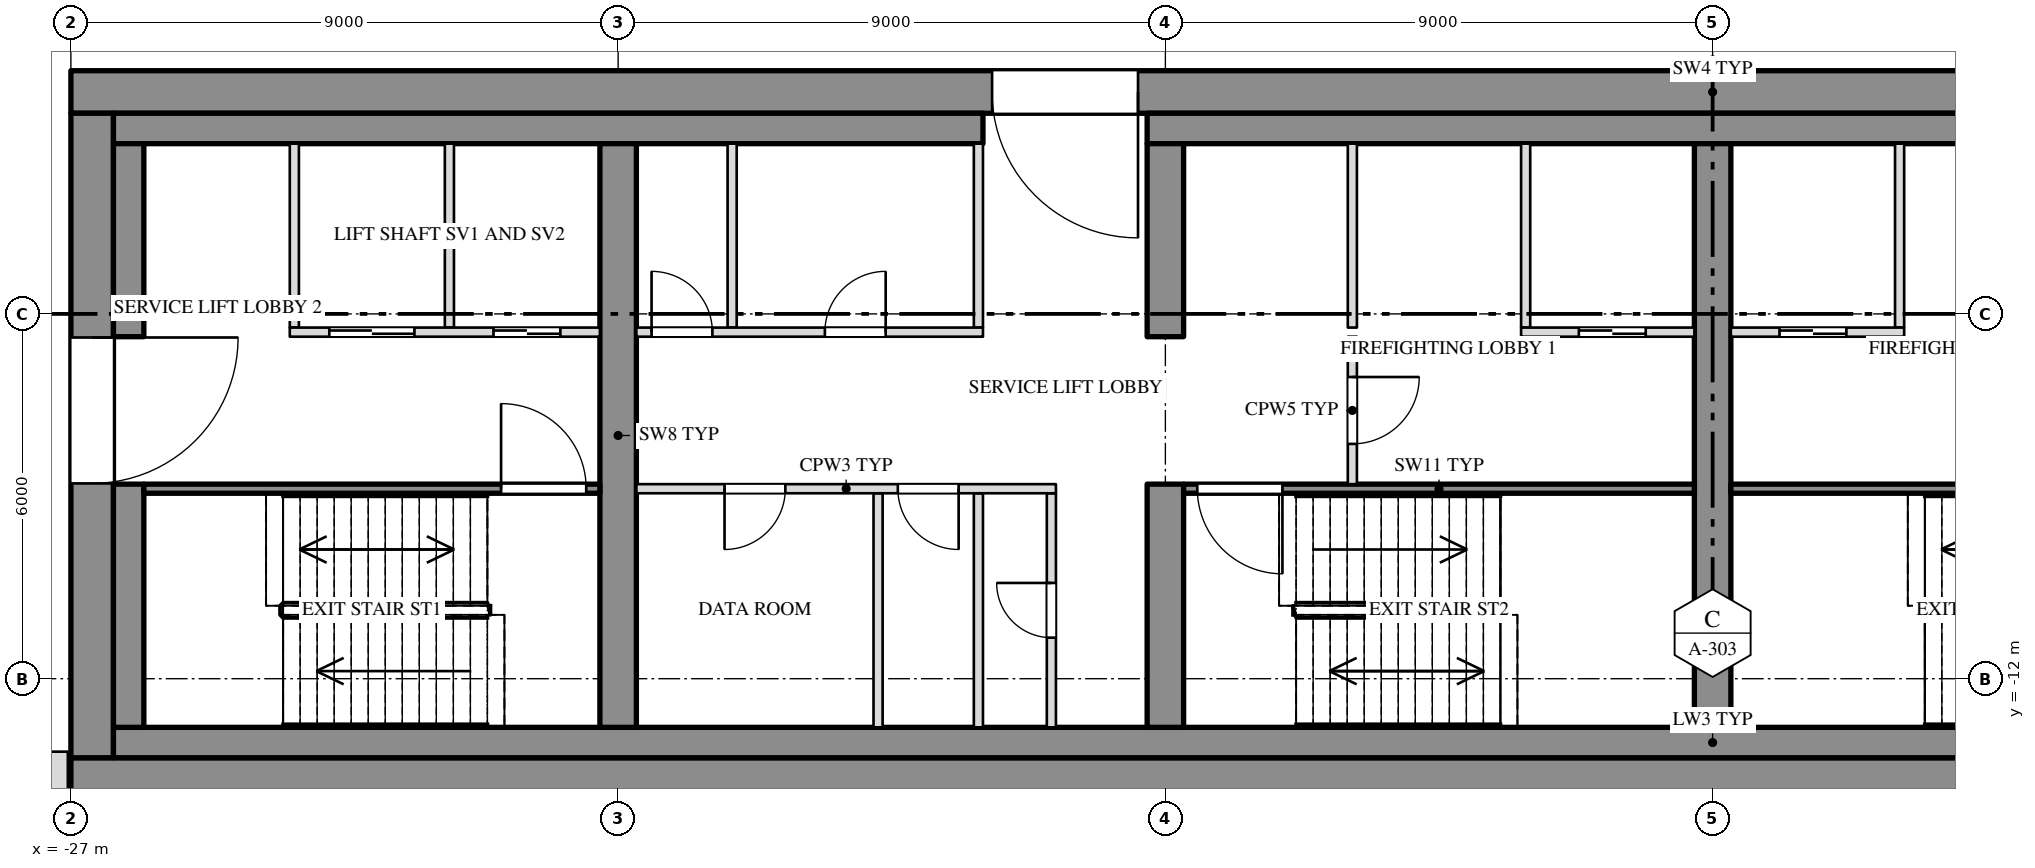
"""IFC4 building model, lengths in metres.
Left out: names, types, materials, properties, quantities, classifications, styles, units other than length and angle.
Written with IfcOpenShell. Run it as: python <this file> out.ifc"""

import sys

from ifc_helpers import new_model, si_unit, direction, frame, frame_2d, origin, place, context, subcontext, project, spatial, rectangle, extrude, element, fill, save


model = new_model("IFC4")
c1 = context("Model", 3, precision=1e-05, world=origin(), true_north=direction((0.0, 1.0)))
c2 = subcontext(c1, "Body", "Model", "MODEL_VIEW")
j1 = project(units=[si_unit("LENGTHUNIT", "METRE"), si_unit("PLANEANGLEUNIT", "RADIAN")], contexts=[c1])
p1 = place(None, origin())
s1 = spatial("IfcSite", under=j1, at=p1, CompositionType="ELEMENT")
p2 = place(p1, origin())
s2 = spatial("IfcBuilding", under=s1, at=p2, CompositionType="ELEMENT")
p3 = place(p2, frame((0.0, 0.0, 256.5)))
s3 = spatial("IfcBuildingStorey", under=s2, at=p3, CompositionType="ELEMENT", Elevation=256.5)
p4 = place(p3, frame((-27.0, -2.35, 0.0), z_axis=(0.0, 0.0, 1.0), x_axis=(1.0, 0.0, 0.0)))
e1 = element("IfcWall", 1, at=p4, inside=s3, PredefinedType="SHEAR", context=c2, shape_type="SweptSolid", body=[
    extrude(rectangle(XDim=54.0, YDim=0.7, at=frame_2d((27.0, 0.0))), origin(), (0.0, 0.0, 1.0), 3.8),
])
p5 = place(p4, frame((15.15, 0.0, 0.0)))
e2 = element("IfcOpeningElement", 2, at=p5, cuts=e1, PredefinedType="OPENING", context=c2, shape_type="SweptSolid", body=[
    extrude(rectangle(XDim=2.4, YDim=2.1, at=frame_2d((1.2, 1.05))), frame((0.0, 0.362, 0.0), z_axis=(0.0, -1.0, 0.0), x_axis=(1.0, 0.0, 0.0)), (0.0, 0.0, 1.0), 0.724),
])
p6 = place(p4, frame((36.45, 0.0, 0.0)))
e3 = element("IfcOpeningElement", 3, at=p6, cuts=e1, PredefinedType="OPENING", context=c2, shape_type="SweptSolid", body=[
    extrude(rectangle(XDim=2.4, YDim=2.1, at=frame_2d((1.2, 1.05))), frame((0.0, 0.362, 0.0), z_axis=(0.0, -1.0, 0.0), x_axis=(1.0, 0.0, 0.0)), (0.0, 0.0, 1.0), 0.724),
])
p7 = place(p3, frame((-27.0, -13.65, 0.0), z_axis=(0.0, 0.0, 1.0), x_axis=(1.0, 0.0, 0.0)))
e4 = element("IfcWall", 4, at=p7, inside=s3, PredefinedType="SHEAR", context=c2, shape_type="SweptSolid", body=[
    extrude(rectangle(XDim=54.0, YDim=0.7, at=frame_2d((27.0, 0.0))), origin(), (0.0, 0.0, 1.0), 3.8),
])
p8 = place(p3, frame((-26.65, -13.3, 0.0), z_axis=(0.0, 0.0, 1.0), x_axis=(0.0, 1.0, 0.0)))
e5 = element("IfcWall", 5, at=p8, inside=s3, PredefinedType="SHEAR", context=c2, shape_type="SweptSolid", body=[
    extrude(rectangle(XDim=10.6, YDim=0.7, at=frame_2d((5.3, 0.0))), origin(), (0.0, 0.0, 1.0), 3.8),
])
p9 = place(p8, frame((4.512, 0.0, 0.0)))
e6 = element("IfcOpeningElement", 6, at=p9, cuts=e5, PredefinedType="OPENING", context=c2, shape_type="SweptSolid", body=[
    extrude(rectangle(XDim=2.4, YDim=2.1, at=frame_2d((1.2, 1.05))), frame((0.0, 0.362, 0.0), z_axis=(0.0, -1.0, 0.0), x_axis=(1.0, 0.0, 0.0)), (0.0, 0.0, 1.0), 0.724),
])
p10 = place(p3, frame((-26.3, -2.95, 0.0), z_axis=(0.0, 0.0, 1.0), x_axis=(1.0, 0.0, 0.0)))
e7 = element("IfcWall", 7, at=p10, inside=s3, PredefinedType="SHEAR", context=c2, shape_type="SweptSolid", body=[
    extrude(rectangle(XDim=14.3, YDim=0.5, at=frame_2d((7.15, 0.0))), origin(), (0.0, 0.0, 1.0), 3.8),
])
p11 = place(p3, frame((-9.3, -2.95, 0.0), z_axis=(0.0, 0.0, 1.0), x_axis=(1.0, 0.0, 0.0)))
e8 = element("IfcWall", 8, at=p11, inside=s3, PredefinedType="SHEAR", context=c2, shape_type="SweptSolid", body=[
    extrude(rectangle(XDim=18.6, YDim=0.5, at=frame_2d((9.3, 0.0))), origin(), (0.0, 0.0, 1.0), 3.8),
])
p12 = place(p3, frame((-26.3, -13.05, 0.0), z_axis=(0.0, 0.0, 1.0), x_axis=(1.0, 0.0, 0.0)))
e9 = element("IfcWall", 9, at=p12, inside=s3, PredefinedType="SHEAR", context=c2, shape_type="SweptSolid", body=[
    extrude(rectangle(XDim=52.6, YDim=0.5, at=frame_2d((26.3, 0.0))), origin(), (0.0, 0.0, 1.0), 3.8),
])
p13 = place(p3, frame((-26.05, -12.8, 0.0), z_axis=(0.0, 0.0, 1.0), x_axis=(0.0, 1.0, 0.0)))
e10 = element("IfcWall", 10, at=p13, inside=s3, PredefinedType="SHEAR", context=c2, shape_type="SweptSolid", body=[
    extrude(rectangle(XDim=4.0, YDim=0.5, at=frame_2d((2.0, 0.0))), origin(), (0.0, 0.0, 1.0), 3.8),
])
p14 = place(p3, frame((-26.05, -6.375, 0.0), z_axis=(0.0, 0.0, 1.0), x_axis=(0.0, 1.0, 0.0)))
e11 = element("IfcWall", 11, at=p14, inside=s3, PredefinedType="SHEAR", context=c2, shape_type="SweptSolid", body=[
    extrude(rectangle(XDim=3.175, YDim=0.5, at=frame_2d((1.587, 0.0))), origin(), (0.0, 0.0, 1.0), 3.8),
])
p15 = place(p3, frame((-18.0, -12.8, 0.0), z_axis=(0.0, 0.0, 1.0), x_axis=(0.0, 1.0, 0.0)))
e12 = element("IfcWall", 12, at=p15, inside=s3, PredefinedType="SHEAR", context=c2, shape_type="SweptSolid", body=[
    extrude(rectangle(XDim=9.6, YDim=0.6, at=frame_2d((4.8, 0.0))), origin(), (0.0, 0.0, 1.0), 3.8),
])
p16 = place(p3, frame((-9.0, -12.8, 0.0), z_axis=(0.0, 0.0, 1.0), x_axis=(0.0, 1.0, 0.0)))
e13 = element("IfcWall", 13, at=p16, inside=s3, PredefinedType="SHEAR", context=c2, shape_type="SweptSolid", body=[
    extrude(rectangle(XDim=4.0, YDim=0.6, at=frame_2d((2.0, 0.0))), origin(), (0.0, 0.0, 1.0), 3.8),
])
p17 = place(p3, frame((-9.0, -6.375, 0.0), z_axis=(0.0, 0.0, 1.0), x_axis=(0.0, 1.0, 0.0)))
e14 = element("IfcWall", 14, at=p17, inside=s3, PredefinedType="SHEAR", context=c2, shape_type="SweptSolid", body=[
    extrude(rectangle(XDim=3.175, YDim=0.6, at=frame_2d((1.587, 0.0))), origin(), (0.0, 0.0, 1.0), 3.8),
])
p18 = place(p3, frame((0.0, -12.8, 0.0), z_axis=(0.0, 0.0, 1.0), x_axis=(0.0, 1.0, 0.0)))
e15 = element("IfcWall", 15, at=p18, inside=s3, PredefinedType="SHEAR", context=c2, shape_type="SweptSolid", body=[
    extrude(rectangle(XDim=9.6, YDim=0.6, at=frame_2d((4.8, 0.0))), origin(), (0.0, 0.0, 1.0), 3.8),
])
p19 = place(p3, frame((-29.948, -13.6, 0.0), z_axis=(0.0, 0.0, 1.0), x_axis=(1.0, 0.0, 0.0)))
e16 = element("IfcWall", 16, at=p19, inside=s3, PredefinedType="SOLIDWALL", context=c2, shape_type="SweptSolid", body=[
    extrude(rectangle(XDim=2.897, YDim=0.8, at=frame_2d((1.449, 0.0))), origin(), (0.0, 0.0, 1.0), 3.8),
])
for number, where, z_axis, x_axis in (
    (17, (-20.775, -6.225, 0.0), (0.0, 0.0, 1.0), (0.0, 1.0, 0.0)),
    (18, (-23.325, -6.225, 0.0), (0.0, 0.0, 1.0), (0.0, 1.0, 0.0)),
    (19, (-12.075, -6.225, 0.0), (0.0, 0.0, 1.0), (0.0, 1.0, 0.0)),
    (20, (-16.125, -6.225, 0.0), (0.0, 0.0, 1.0), (0.0, 1.0, 0.0)),
    (21, (-3.075, -6.225, 0.0), (0.0, 0.0, 1.0), (0.0, 1.0, 0.0)),
    (22, (-5.925, -6.225, 0.0), (0.0, 0.0, 1.0), (0.0, 1.0, 0.0)),
    (23, (3.075, -6.225, 0.0), (0.0, 0.0, 1.0), (0.0, 1.0, 0.0)),
):
    element("IfcWall", number, at=place(p3, frame(where, z_axis=z_axis, x_axis=x_axis)), inside=s3, PredefinedType="PARTITIONING", context=c2, shape_type="SweptSolid", body=[
        extrude(rectangle(XDim=3.025, YDim=0.15, at=frame_2d((1.513, 0.0))), origin(), (0.0, 0.0, 1.0), 3.8),
    ])
p20 = place(p3, frame((-10.875, -12.8, 0.0), z_axis=(0.0, 0.0, 1.0), x_axis=(0.0, 1.0, 0.0)))
e24 = element("IfcWall", 24, at=p20, inside=s3, PredefinedType="PARTITIONING", context=c2, shape_type="SweptSolid", body=[
    extrude(rectangle(XDim=3.85, YDim=0.15, at=frame_2d((1.925, 0.0))), origin(), (0.0, 0.0, 1.0), 3.8),
])
p21 = place(p20, frame((1.475, 0.0, 0.0)))
e25 = element("IfcOpeningElement", 25, at=p21, cuts=e24, PredefinedType="OPENING", context=c2, shape_type="SweptSolid", body=[
    extrude(rectangle(XDim=0.9, YDim=2.1, at=frame_2d((0.45, 1.05))), frame((0.0, 0.087, 0.0), z_axis=(0.0, -1.0, 0.0), x_axis=(1.0, 0.0, 0.0)), (0.0, 0.0, 1.0), 0.174),
])
for number, where, z_axis, x_axis in (
    (26, (-12.075, -12.8, 0.0), (0.0, 0.0, 1.0), (0.0, 1.0, 0.0)),
    (27, (-13.725, -12.8, 0.0), (0.0, 0.0, 1.0), (0.0, 1.0, 0.0)),
):
    element("IfcWall", number, at=place(p3, frame(where, z_axis=z_axis, x_axis=x_axis)), inside=s3, PredefinedType="PARTITIONING", context=c2, shape_type="SweptSolid", body=[
        extrude(rectangle(XDim=3.85, YDim=0.15, at=frame_2d((1.925, 0.0))), origin(), (0.0, 0.0, 1.0), 3.8),
    ])
p22 = place(p3, frame((-5.925, -8.8, 0.0), z_axis=(0.0, 0.0, 1.0), x_axis=(0.0, 1.0, 0.0)))
e28 = element("IfcWall", 28, at=p22, inside=s3, PredefinedType="PARTITIONING", context=c2, shape_type="SweptSolid", body=[
    extrude(rectangle(XDim=2.425, YDim=0.15, at=frame_2d((1.212, 0.0))), origin(), (0.0, 0.0, 1.0), 3.8),
])
p23 = place(p22, frame((0.662, 0.0, 0.0)))
e29 = element("IfcOpeningElement", 29, at=p23, cuts=e28, PredefinedType="OPENING", context=c2, shape_type="SweptSolid", body=[
    extrude(rectangle(XDim=1.1, YDim=2.1, at=frame_2d((0.55, 1.05))), frame((0.0, 0.087, 0.0), z_axis=(0.0, -1.0, 0.0), x_axis=(1.0, 0.0, 0.0)), (0.0, 0.0, 1.0), 0.174),
])
p24 = place(p3, frame((-23.4, -6.3, 0.0), z_axis=(0.0, 0.0, 1.0), x_axis=(1.0, 0.0, 0.0)))
e30 = element("IfcWall", 30, at=p24, inside=s3, PredefinedType="PARTITIONING", context=c2, shape_type="SweptSolid", body=[
    extrude(rectangle(XDim=5.1, YDim=0.15, at=frame_2d((2.55, 0.0))), origin(), (0.0, 0.0, 1.0), 3.8),
])
p25 = place(p24, frame((0.65, 0.0, 0.0)))
e31 = element("IfcOpeningElement", 31, at=p25, cuts=e30, PredefinedType="OPENING", context=c2, shape_type="SweptSolid", body=[
    extrude(rectangle(XDim=1.4, YDim=2.1, at=frame_2d((0.7, 1.05))), frame((0.0, 0.087, 0.0), z_axis=(0.0, -1.0, 0.0), x_axis=(1.0, 0.0, 0.0)), (0.0, 0.0, 1.0), 0.174),
])
p26 = place(p24, frame((3.35, 0.0, 0.0)))
e32 = element("IfcOpeningElement", 32, at=p26, cuts=e30, PredefinedType="OPENING", context=c2, shape_type="SweptSolid", body=[
    extrude(rectangle(XDim=1.1, YDim=2.1, at=frame_2d((0.55, 1.05))), frame((0.0, 0.087, 0.0), z_axis=(0.0, -1.0, 0.0), x_axis=(1.0, 0.0, 0.0)), (0.0, 0.0, 1.0), 0.174),
])
p27 = place(p3, frame((-17.7, -6.3, 0.0), z_axis=(0.0, 0.0, 1.0), x_axis=(1.0, 0.0, 0.0)))
e33 = element("IfcWall", 33, at=p27, inside=s3, PredefinedType="PARTITIONING", context=c2, shape_type="SweptSolid", body=[
    extrude(rectangle(XDim=5.7, YDim=0.15, at=frame_2d((2.85, 0.0))), origin(), (0.0, 0.0, 1.0), 3.8),
])
p28 = place(p27, frame((0.25, 0.0, 0.0)))
e34 = element("IfcOpeningElement", 34, at=p28, cuts=e33, PredefinedType="OPENING", context=c2, shape_type="SweptSolid", body=[
    extrude(rectangle(XDim=1.0, YDim=2.1, at=frame_2d((0.5, 1.05))), frame((0.0, 0.087, 0.0), z_axis=(0.0, -1.0, 0.0), x_axis=(1.0, 0.0, 0.0)), (0.0, 0.0, 1.0), 0.174),
])
p29 = place(p27, frame((3.1, 0.0, 0.0)))
e35 = element("IfcOpeningElement", 35, at=p29, cuts=e33, PredefinedType="OPENING", context=c2, shape_type="SweptSolid", body=[
    extrude(rectangle(XDim=1.0, YDim=2.1, at=frame_2d((0.5, 1.05))), frame((0.0, 0.087, 0.0), z_axis=(0.0, -1.0, 0.0), x_axis=(1.0, 0.0, 0.0)), (0.0, 0.0, 1.0), 0.174),
])
p30 = place(p3, frame((-3.15, -6.3, 0.0), z_axis=(0.0, 0.0, 1.0), x_axis=(1.0, 0.0, 0.0)))
e36 = element("IfcWall", 36, at=p30, inside=s3, PredefinedType="PARTITIONING", context=c2, shape_type="SweptSolid", body=[
    extrude(rectangle(XDim=2.85, YDim=0.15, at=frame_2d((1.425, 0.0))), origin(), (0.0, 0.0, 1.0), 3.8),
])
p31 = place(p30, frame((0.95, 0.0, 0.0)))
e37 = element("IfcOpeningElement", 37, at=p31, cuts=e36, PredefinedType="OPENING", context=c2, shape_type="SweptSolid", body=[
    extrude(rectangle(XDim=1.1, YDim=2.1, at=frame_2d((0.55, 1.05))), frame((0.0, 0.087, 0.0), z_axis=(0.0, -1.0, 0.0), x_axis=(1.0, 0.0, 0.0)), (0.0, 0.0, 1.0), 0.174),
])
p32 = place(p3, frame((0.3, -6.3, 0.0), z_axis=(0.0, 0.0, 1.0), x_axis=(1.0, 0.0, 0.0)))
e38 = element("IfcWall", 38, at=p32, inside=s3, PredefinedType="PARTITIONING", context=c2, shape_type="SweptSolid", body=[
    extrude(rectangle(XDim=2.85, YDim=0.15, at=frame_2d((1.425, 0.0))), origin(), (0.0, 0.0, 1.0), 3.8),
])
p33 = place(p32, frame((0.8, 0.0, 0.0)))
e39 = element("IfcOpeningElement", 39, at=p33, cuts=e38, PredefinedType="OPENING", context=c2, shape_type="SweptSolid", body=[
    extrude(rectangle(XDim=1.1, YDim=2.1, at=frame_2d((0.55, 1.05))), frame((0.0, 0.087, 0.0), z_axis=(0.0, -1.0, 0.0), x_axis=(1.0, 0.0, 0.0)), (0.0, 0.0, 1.0), 0.174),
])
p34 = place(p3, frame((-25.8, -8.875, 0.0), z_axis=(0.0, 0.0, 1.0), x_axis=(1.0, 0.0, 0.0)))
e40 = element("IfcWall", 40, at=p34, inside=s3, PredefinedType="SHEAR", context=c2, shape_type="SweptSolid", body=[
    extrude(rectangle(XDim=7.5, YDim=0.15, at=frame_2d((3.75, 0.0))), origin(), (0.0, 0.0, 1.0), 3.8),
])
p35 = place(p34, frame((5.875, 0.0, 0.0)))
e41 = element("IfcOpeningElement", 41, at=p35, cuts=e40, PredefinedType="OPENING", context=c2, shape_type="SweptSolid", body=[
    extrude(rectangle(XDim=1.4, YDim=2.1, at=frame_2d((0.7, 1.05))), frame((0.0, 0.087, 0.0), z_axis=(0.0, -1.0, 0.0), x_axis=(1.0, 0.0, 0.0)), (0.0, 0.0, 1.0), 0.174),
])
p36 = place(p3, frame((-17.7, -8.875, 0.0), z_axis=(0.0, 0.0, 1.0), x_axis=(1.0, 0.0, 0.0)))
e42 = element("IfcWall", 42, at=p36, inside=s3, PredefinedType="PARTITIONING", context=c2, shape_type="SweptSolid", body=[
    extrude(rectangle(XDim=6.9, YDim=0.15, at=frame_2d((3.45, 0.0))), origin(), (0.0, 0.0, 1.0), 3.8),
])
p37 = place(p36, frame((1.45, 0.0, 0.0)))
e43 = element("IfcOpeningElement", 43, at=p37, cuts=e42, PredefinedType="OPENING", context=c2, shape_type="SweptSolid", body=[
    extrude(rectangle(XDim=1.0, YDim=2.1, at=frame_2d((0.5, 1.05))), frame((0.0, 0.087, 0.0), z_axis=(0.0, -1.0, 0.0), x_axis=(1.0, 0.0, 0.0)), (0.0, 0.0, 1.0), 0.174),
])
p38 = place(p36, frame((4.3, 0.0, 0.0)))
e44 = element("IfcOpeningElement", 44, at=p38, cuts=e42, PredefinedType="OPENING", context=c2, shape_type="SweptSolid", body=[
    extrude(rectangle(XDim=1.0, YDim=2.1, at=frame_2d((0.5, 1.05))), frame((0.0, 0.087, 0.0), z_axis=(0.0, -1.0, 0.0), x_axis=(1.0, 0.0, 0.0)), (0.0, 0.0, 1.0), 0.174),
])
p39 = place(p3, frame((-8.7, -8.875, 0.0), z_axis=(0.0, 0.0, 1.0), x_axis=(1.0, 0.0, 0.0)))
e45 = element("IfcWall", 45, at=p39, inside=s3, PredefinedType="SHEAR", context=c2, shape_type="SweptSolid", body=[
    extrude(rectangle(XDim=8.4, YDim=0.15, at=frame_2d((4.2, 0.0))), origin(), (0.0, 0.0, 1.0), 3.8),
])
p40 = place(p39, frame((0.225, 0.0, 0.0)))
e46 = element("IfcOpeningElement", 46, at=p40, cuts=e45, PredefinedType="OPENING", context=c2, shape_type="SweptSolid", body=[
    extrude(rectangle(XDim=1.4, YDim=2.1, at=frame_2d((0.7, 1.05))), frame((0.0, 0.087, 0.0), z_axis=(0.0, -1.0, 0.0), x_axis=(1.0, 0.0, 0.0)), (0.0, 0.0, 1.0), 0.174),
])
p41 = place(p3, frame((0.3, -8.875, 0.0), z_axis=(0.0, 0.0, 1.0), x_axis=(1.0, 0.0, 0.0)))
e47 = element("IfcWall", 47, at=p41, inside=s3, PredefinedType="SHEAR", context=c2, shape_type="SweptSolid", body=[
    extrude(rectangle(XDim=8.4, YDim=0.15, at=frame_2d((4.2, 0.0))), origin(), (0.0, 0.0, 1.0), 3.8),
])
p42 = place(p41, frame((6.775, 0.0, 0.0)))
e48 = element("IfcOpeningElement", 48, at=p42, cuts=e47, PredefinedType="OPENING", context=c2, shape_type="SweptSolid", body=[
    extrude(rectangle(XDim=1.4, YDim=2.1, at=frame_2d((0.7, 1.05))), frame((0.0, 0.087, 0.0), z_axis=(0.0, -1.0, 0.0), x_axis=(1.0, 0.0, 0.0)), (0.0, 0.0, 1.0), 0.174),
])
p43 = place(p9, origin())
e49 = element("IfcDoor", 49, at=p43, inside=s3, OperationType="DOUBLE_DOOR_SINGLE_SWING", PredefinedType="DOOR", context=c2, shape_type="SweptSolid", body=[
    extrude(rectangle(XDim=2.4, YDim=2.1, at=frame_2d((1.2, 1.05))), frame((0.0, 0.025, 0.0), z_axis=(0.0, -1.0, 0.0), x_axis=(1.0, 0.0, 0.0)), (0.0, 0.0, 1.0), 0.05),
])
fill(e6, e49)
p44 = place(p25, origin())
e50 = element("IfcDoor", 50, at=p44, inside=s3, OperationType="SLIDING_TO_RIGHT", PredefinedType="DOOR", context=c2, shape_type="SweptSolid", body=[
    extrude(rectangle(XDim=1.4, YDim=2.1, at=frame_2d((0.7, 1.05))), frame((0.0, 0.025, 0.0), z_axis=(0.0, -1.0, 0.0), x_axis=(1.0, 0.0, 0.0)), (0.0, 0.0, 1.0), 0.05),
])
fill(e31, e50)
p45 = place(p26, origin())
e51 = element("IfcDoor", 51, at=p45, inside=s3, OperationType="SLIDING_TO_LEFT", PredefinedType="DOOR", context=c2, shape_type="SweptSolid", body=[
    extrude(rectangle(XDim=1.1, YDim=2.1, at=frame_2d((0.55, 1.05))), frame((0.0, 0.025, 0.0), z_axis=(0.0, -1.0, 0.0), x_axis=(1.0, 0.0, 0.0)), (0.0, 0.0, 1.0), 0.05),
])
fill(e32, e51)
p46 = place(p35, origin())
e52 = element("IfcDoor", 52, at=p46, inside=s3, OperationType="DOUBLE_DOOR_SINGLE_SWING", PredefinedType="DOOR", context=c2, shape_type="SweptSolid", body=[
    extrude(rectangle(XDim=1.4, YDim=2.1, at=frame_2d((0.7, 1.05))), frame((0.0, 0.025, 0.0), z_axis=(0.0, -1.0, 0.0), x_axis=(1.0, 0.0, 0.0)), (0.0, 0.0, 1.0), 0.05),
])
fill(e41, e52)
p47 = place(p28, origin())
e53 = element("IfcDoor", 53, at=p47, inside=s3, OperationType="SINGLE_SWING_LEFT", PredefinedType="DOOR", context=c2, shape_type="SweptSolid", body=[
    extrude(rectangle(XDim=1.0, YDim=2.1, at=frame_2d((0.5, 1.05))), frame((0.0, 0.025, 0.0), z_axis=(0.0, -1.0, 0.0), x_axis=(1.0, 0.0, 0.0)), (0.0, 0.0, 1.0), 0.05),
])
fill(e34, e53)
p48 = place(p37, origin())
e54 = element("IfcDoor", 54, at=p48, inside=s3, OperationType="SINGLE_SWING_RIGHT", PredefinedType="DOOR", context=c2, shape_type="SweptSolid", body=[
    extrude(rectangle(XDim=1.0, YDim=2.1, at=frame_2d((0.5, 1.05))), frame((0.0, 0.025, 0.0), z_axis=(0.0, -1.0, 0.0), x_axis=(1.0, 0.0, 0.0)), (0.0, 0.0, 1.0), 0.05),
])
fill(e43, e54)
p49 = place(p29, origin())
e55 = element("IfcDoor", 55, at=p49, inside=s3, OperationType="SINGLE_SWING_RIGHT", PredefinedType="DOOR", context=c2, shape_type="SweptSolid", body=[
    extrude(rectangle(XDim=1.0, YDim=2.1, at=frame_2d((0.5, 1.05))), frame((0.0, 0.025, 0.0), z_axis=(0.0, -1.0, 0.0), x_axis=(1.0, 0.0, 0.0)), (0.0, 0.0, 1.0), 0.05),
])
fill(e35, e55)
p50 = place(p38, origin())
e56 = element("IfcDoor", 56, at=p50, inside=s3, OperationType="SINGLE_SWING_LEFT", PredefinedType="DOOR", context=c2, shape_type="SweptSolid", body=[
    extrude(rectangle(XDim=1.0, YDim=2.1, at=frame_2d((0.5, 1.05))), frame((0.0, 0.025, 0.0), z_axis=(0.0, -1.0, 0.0), x_axis=(1.0, 0.0, 0.0)), (0.0, 0.0, 1.0), 0.05),
])
fill(e44, e56)
p51 = place(p21, origin())
e57 = element("IfcDoor", 57, at=p51, inside=s3, OperationType="SINGLE_SWING_RIGHT", PredefinedType="DOOR", context=c2, shape_type="SweptSolid", body=[
    extrude(rectangle(XDim=0.9, YDim=2.1, at=frame_2d((0.45, 1.05))), frame((0.0, 0.025, 0.0), z_axis=(0.0, -1.0, 0.0), x_axis=(1.0, 0.0, 0.0)), (0.0, 0.0, 1.0), 0.05),
])
fill(e25, e57)
p52 = place(p5, origin())
e58 = element("IfcDoor", 58, at=p52, inside=s3, OperationType="DOUBLE_DOOR_SINGLE_SWING", PredefinedType="DOOR", context=c2, shape_type="SweptSolid", body=[
    extrude(rectangle(XDim=2.4, YDim=2.1, at=frame_2d((1.2, 1.05))), frame((0.0, 0.025, 0.0), z_axis=(0.0, -1.0, 0.0), x_axis=(1.0, 0.0, 0.0)), (0.0, 0.0, 1.0), 0.05),
])
fill(e2, e58)
p53 = place(p40, origin())
e59 = element("IfcDoor", 59, at=p53, inside=s3, OperationType="DOUBLE_DOOR_SINGLE_SWING", PredefinedType="DOOR", context=c2, shape_type="SweptSolid", body=[
    extrude(rectangle(XDim=1.4, YDim=2.1, at=frame_2d((0.7, 1.05))), frame((0.0, 0.025, 0.0), z_axis=(0.0, -1.0, 0.0), x_axis=(1.0, 0.0, 0.0)), (0.0, 0.0, 1.0), 0.05),
])
fill(e46, e59)
p54 = place(p23, origin())
e60 = element("IfcDoor", 60, at=p54, inside=s3, OperationType="SINGLE_SWING_LEFT", PredefinedType="DOOR", context=c2, shape_type="SweptSolid", body=[
    extrude(rectangle(XDim=1.1, YDim=2.1, at=frame_2d((0.55, 1.05))), frame((0.0, 0.025, 0.0), z_axis=(0.0, -1.0, 0.0), x_axis=(1.0, 0.0, 0.0)), (0.0, 0.0, 1.0), 0.05),
])
fill(e29, e60)
p55 = place(p31, origin())
e61 = element("IfcDoor", 61, at=p55, inside=s3, OperationType="SLIDING_TO_LEFT", PredefinedType="DOOR", context=c2, shape_type="SweptSolid", body=[
    extrude(rectangle(XDim=1.1, YDim=2.1, at=frame_2d((0.55, 1.05))), frame((0.0, 0.025, 0.0), z_axis=(0.0, -1.0, 0.0), x_axis=(1.0, 0.0, 0.0)), (0.0, 0.0, 1.0), 0.05),
])
fill(e37, e61)
p56 = place(p33, origin())
e62 = element("IfcDoor", 62, at=p56, inside=s3, OperationType="SLIDING_TO_RIGHT", PredefinedType="DOOR", context=c2, shape_type="SweptSolid", body=[
    extrude(rectangle(XDim=1.1, YDim=2.1, at=frame_2d((0.55, 1.05))), frame((0.0, 0.025, 0.0), z_axis=(0.0, -1.0, 0.0), x_axis=(1.0, 0.0, 0.0)), (0.0, 0.0, 1.0), 0.05),
])
fill(e39, e62)
save(model, sys.argv[1])
